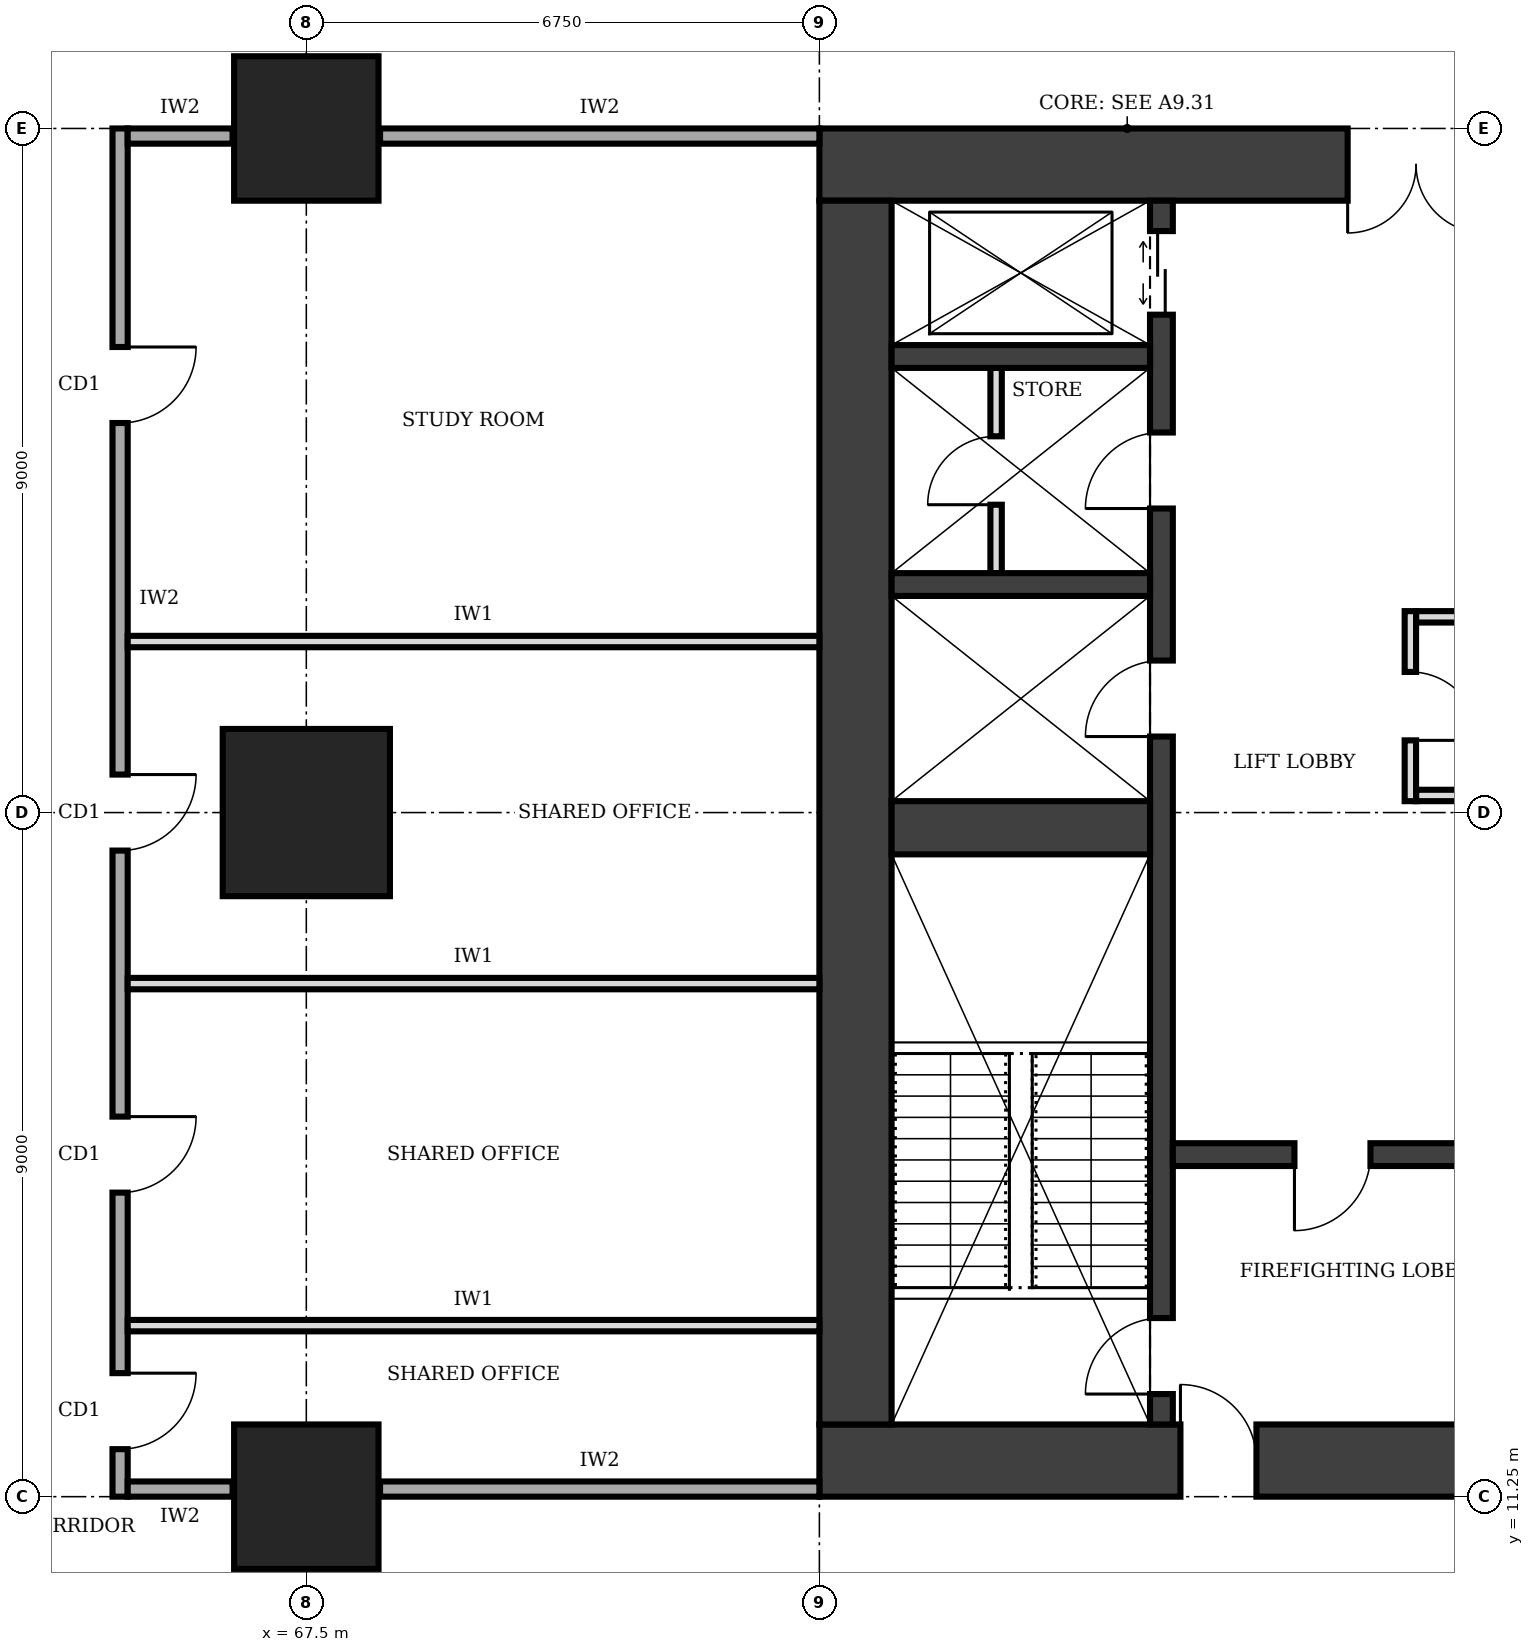
"""IFC4 building model, lengths in metres.
Left out: names, types, materials, properties, quantities, classifications, styles, units other than length and angle.
Written with IfcOpenShell. Run it as: python <this file> out.ifc"""

import sys

from ifc_helpers import new_model, si_unit, direction, frame, frame_2d, origin, origin_2d, place, context, subcontext, project, spatial, rectangle, extrude, element, fill, save


model = new_model("IFC4")
c1 = context("Model", 3, precision=1e-05, world=origin(), true_north=direction((0.0, 1.0)))
c2 = subcontext(c1, "Body", "Model", "MODEL_VIEW")
j1 = project(units=[si_unit("LENGTHUNIT", "METRE"), si_unit("PLANEANGLEUNIT", "RADIAN")], contexts=[c1])
p1 = place(None, origin())
s1 = spatial("IfcSite", under=j1, at=p1, CompositionType="ELEMENT")
p2 = place(p1, origin())
s2 = spatial("IfcBuilding", under=s1, at=p2, CompositionType="ELEMENT")
p3 = place(p2, frame((0.0, 0.0, 149.0)))
s3 = spatial("IfcBuildingStorey", under=s2, at=p3, CompositionType="ELEMENT", Elevation=149.0)
p4 = place(p3, frame((74.25, 11.725, 0.0), z_axis=(0.0, 0.0, 1.0), x_axis=(1.0, 0.0, 0.0)))
e1 = element("IfcWall", 1, at=p4, inside=s3, PredefinedType="SHEAR", context=c2, shape_type="SweptSolid", body=[
    extrude(rectangle(XDim=13.5, YDim=0.95, at=frame_2d((6.75, 0.0))), origin(), (0.0, 0.0, 1.0), 4.0),
])
p5 = place(p4, frame((4.75, 0.0, 0.0)))
e2 = element("IfcOpeningElement", 2, at=p5, cuts=e1, PredefinedType="OPENING", context=c2, shape_type="SweptSolid", body=[
    extrude(rectangle(XDim=1.0, YDim=2.1, at=frame_2d((0.5, 1.05))), frame((0.0, 0.485, 0.0), z_axis=(0.0, -1.0, 0.0), x_axis=(1.0, 0.0, 0.0)), (0.0, 0.0, 1.0), 0.97),
])
p6 = place(p3, frame((87.75, 28.775, 0.0), z_axis=(0.0, 0.0, 1.0), x_axis=(-1.0, 0.0, 0.0)))
e3 = element("IfcWall", 3, at=p6, inside=s3, PredefinedType="SHEAR", context=c2, shape_type="SweptSolid", body=[
    extrude(rectangle(XDim=13.5, YDim=0.95, at=frame_2d((6.75, 0.0))), origin(), (0.0, 0.0, 1.0), 4.0),
])
p7 = place(p6, frame((4.75, 0.0, 0.0)))
e4 = element("IfcOpeningElement", 4, at=p7, cuts=e3, PredefinedType="OPENING", context=c2, shape_type="SweptSolid", body=[
    extrude(rectangle(XDim=1.8, YDim=2.1, at=frame_2d((0.9, 1.05))), frame((0.0, 0.485, 0.0), z_axis=(0.0, -1.0, 0.0), x_axis=(1.0, 0.0, 0.0)), (0.0, 0.0, 1.0), 0.97),
])
p8 = place(p3, frame((74.725, 28.3, 0.0), z_axis=(0.0, 0.0, 1.0), x_axis=(0.0, -1.0, 0.0)))
e5 = element("IfcWall", 5, at=p8, inside=s3, PredefinedType="SHEAR", context=c2, shape_type="SweptSolid", body=[
    extrude(rectangle(XDim=16.1, YDim=0.95, at=frame_2d((8.05, 0.0))), origin(), (0.0, 0.0, 1.0), 4.0),
])
p9 = place(p3, frame((78.75, 12.2, 0.0), z_axis=(0.0, 0.0, 1.0), x_axis=(0.0, 1.0, 0.0)))
e6 = element("IfcWall", 6, at=p9, inside=s3, PredefinedType="SHEAR", context=c2, shape_type="SweptSolid", body=[
    extrude(rectangle(XDim=16.1, YDim=0.3, at=frame_2d((8.05, 0.0))), origin(), (0.0, 0.0, 1.0), 4.0),
])
p10 = place(p9, frame((0.4, 0.0, 0.0)))
e7 = element("IfcOpeningElement", 7, at=p10, cuts=e6, PredefinedType="OPENING", context=c2, shape_type="SweptSolid", body=[
    extrude(rectangle(XDim=1.0, YDim=2.1, at=frame_2d((0.5, 1.05))), frame((0.0, 0.16, 0.0), z_axis=(0.0, -1.0, 0.0), x_axis=(1.0, 0.0, 0.0)), (0.0, 0.0, 1.0), 0.32),
])
p11 = place(p9, frame((14.6, 0.0, 0.0)))
e8 = element("IfcOpeningElement", 8, at=p11, cuts=e6, PredefinedType="OPENING", context=c2, shape_type="SweptSolid", body=[
    extrude(rectangle(XDim=1.1, YDim=2.1, at=frame_2d((0.55, 1.05))), frame((0.0, 0.16, 0.0), z_axis=(0.0, -1.0, 0.0), x_axis=(1.0, 0.0, 0.0)), (0.0, 0.0, 1.0), 0.32),
])
p12 = place(p9, frame((9.05, 0.0, 0.0)))
e9 = element("IfcOpeningElement", 9, at=p12, cuts=e6, PredefinedType="OPENING", context=c2, shape_type="SweptSolid", body=[
    extrude(rectangle(XDim=1.0, YDim=2.1, at=frame_2d((0.5, 1.05))), frame((0.0, 0.16, 0.0), z_axis=(0.0, -1.0, 0.0), x_axis=(1.0, 0.0, 0.0)), (0.0, 0.0, 1.0), 0.32),
])
p13 = place(p9, frame((12.05, 0.0, 0.0)))
e10 = element("IfcOpeningElement", 10, at=p13, cuts=e6, PredefinedType="OPENING", context=c2, shape_type="SweptSolid", body=[
    extrude(rectangle(XDim=1.0, YDim=2.1, at=frame_2d((0.5, 1.05))), frame((0.0, 0.16, 0.0), z_axis=(0.0, -1.0, 0.0), x_axis=(1.0, 0.0, 0.0)), (0.0, 0.0, 1.0), 0.32),
])
p14 = place(p3, frame((75.2, 20.05, 0.0), z_axis=(0.0, 0.0, 1.0), x_axis=(1.0, 0.0, 0.0)))
e11 = element("IfcWall", 11, at=p14, inside=s3, PredefinedType="SHEAR", context=c2, shape_type="SweptSolid", body=[
    extrude(rectangle(XDim=3.4, YDim=0.7, at=frame_2d((1.7, 0.0))), origin(), (0.0, 0.0, 1.0), 4.0),
])
p15 = place(p3, frame((78.9, 15.75, 0.0), z_axis=(0.0, 0.0, 1.0), x_axis=(1.0, 0.0, 0.0)))
e12 = element("IfcWall", 12, at=p15, inside=s3, PredefinedType="SHEAR", context=c2, shape_type="SweptSolid", body=[
    extrude(rectangle(XDim=4.2, YDim=0.3, at=frame_2d((2.1, 0.0))), origin(), (0.0, 0.0, 1.0), 4.0),
])
p16 = place(p15, frame((1.6, 0.0, 0.0)))
e13 = element("IfcOpeningElement", 13, at=p16, cuts=e12, PredefinedType="OPENING", context=c2, shape_type="SweptSolid", body=[
    extrude(rectangle(XDim=1.0, YDim=2.1, at=frame_2d((0.5, 1.05))), frame((0.0, 0.16, 0.0), z_axis=(0.0, -1.0, 0.0), x_axis=(1.0, 0.0, 0.0)), (0.0, 0.0, 1.0), 0.32),
])
for number, where, z_axis, x_axis in (
    (14, (75.2, 23.25, 0.0), (0.0, 0.0, 1.0), (1.0, 0.0, 0.0)),
    (15, (75.2, 26.25, 0.0), (0.0, 0.0, 1.0), (1.0, 0.0, 0.0)),
):
    element("IfcWall", number, at=place(p3, frame(where, z_axis=z_axis, x_axis=x_axis)), inside=s3, PredefinedType="SHEAR", context=c2, shape_type="SweptSolid", body=[
        extrude(rectangle(XDim=3.4, YDim=0.3, at=frame_2d((1.7, 0.0))), origin(), (0.0, 0.0, 1.0), 4.0),
    ])
p17 = place(p3, frame((67.5, 11.25, 0.0), z_axis=(0.0, 0.0, 1.0), x_axis=(1.0, 0.0, 0.0)))
e16 = element("IfcColumn", 16, at=p17, inside=s3, PredefinedType="COLUMN", context=c2, shape_type="SweptSolid", body=[
    extrude(rectangle(XDim=1.9, YDim=1.9, at=origin_2d()), origin(), (0.0, 0.0, 1.0), 4.0),
])
p18 = place(p3, frame((67.5, 20.25, 0.0), z_axis=(0.0, 0.0, 1.0), x_axis=(1.0, 0.0, 0.0)))
e17 = element("IfcColumn", 17, at=p18, inside=s3, PredefinedType="COLUMN", context=c2, shape_type="SweptSolid", body=[
    extrude(rectangle(XDim=2.2, YDim=2.2, at=origin_2d()), origin(), (0.0, 0.0, 1.0), 4.0),
])
p19 = place(p3, frame((67.5, 29.25, 0.0), z_axis=(0.0, 0.0, 1.0), x_axis=(1.0, 0.0, 0.0)))
e18 = element("IfcColumn", 18, at=p19, inside=s3, PredefinedType="COLUMN", context=c2, shape_type="SweptSolid", body=[
    extrude(rectangle(XDim=1.9, YDim=1.9, at=origin_2d()), origin(), (0.0, 0.0, 1.0), 4.0),
])
p20 = place(p3, frame((82.025, 20.4, 0.0), z_axis=(0.0, 0.0, 1.0), x_axis=(0.0, 1.0, 0.0)))
e19 = element("IfcWall", 19, at=p20, inside=s3, PredefinedType="PARTITIONING", context=c2, shape_type="SweptSolid", body=[
    extrude(rectangle(XDim=2.5, YDim=0.15, at=frame_2d((1.25, 0.0))), origin(), (0.0, 0.0, 1.0), 3.75),
])
p21 = place(p20, frame((0.8, 0.0, 0.0)))
e20 = element("IfcOpeningElement", 20, at=p21, cuts=e19, PredefinedType="OPENING", context=c2, shape_type="SweptSolid", body=[
    extrude(rectangle(XDim=0.9, YDim=2.1, at=frame_2d((0.45, 1.05))), frame((0.0, 0.085, 0.0), z_axis=(0.0, -1.0, 0.0), x_axis=(1.0, 0.0, 0.0)), (0.0, 0.0, 1.0), 0.17),
])
for number, where, z_axis, x_axis in (
    (21, (82.1, 20.475, 0.0), (0.0, 0.0, 1.0), (1.0, 0.0, 0.0)),
    (22, (82.1, 22.825, 0.0), (0.0, 0.0, 1.0), (1.0, 0.0, 0.0)),
):
    element("IfcWall", number, at=place(p3, frame(where, z_axis=z_axis, x_axis=x_axis)), inside=s3, PredefinedType="PARTITIONING", context=c2, shape_type="SweptSolid", body=[
        extrude(rectangle(XDim=1.0, YDim=0.15, at=frame_2d((0.5, 0.0))), origin(), (0.0, 0.0, 1.0), 3.75),
    ])
p22 = place(p3, frame((76.575, 23.4, 0.0), z_axis=(0.0, 0.0, 1.0), x_axis=(0.0, 1.0, 0.0)))
e23 = element("IfcWall", 23, at=p22, inside=s3, PredefinedType="PARTITIONING", context=c2, shape_type="SweptSolid", body=[
    extrude(rectangle(XDim=2.7, YDim=0.15, at=frame_2d((1.35, 0.0))), origin(), (0.0, 0.0, 1.0), 3.75),
])
p23 = place(p22, frame((0.9, 0.0, 0.0)))
e24 = element("IfcOpeningElement", 24, at=p23, cuts=e23, PredefinedType="OPENING", context=c2, shape_type="SweptSolid", body=[
    extrude(rectangle(XDim=0.9, YDim=2.1, at=frame_2d((0.45, 1.05))), frame((0.0, 0.085, 0.0), z_axis=(0.0, -1.0, 0.0), x_axis=(1.0, 0.0, 0.0)), (0.0, 0.0, 1.0), 0.17),
])
p24 = place(p3, frame((65.05, 29.25, 0.0), z_axis=(0.0, 0.0, 1.0), x_axis=(0.0, -1.0, 0.0)))
e25 = element("IfcWall", 25, at=p24, inside=s3, PredefinedType="SOLIDWALL", context=c2, shape_type="SweptSolid", body=[
    extrude(rectangle(XDim=18.0, YDim=0.2, at=frame_2d((9.0, 0.0))), origin(), (0.0, 0.0, 1.0), 3.75),
])
p25 = place(p24, frame((16.375, 0.0, 0.0)))
e26 = element("IfcOpeningElement", 26, at=p25, cuts=e25, PredefinedType="OPENING", context=c2, shape_type="SweptSolid", body=[
    extrude(rectangle(XDim=1.0, YDim=2.1, at=frame_2d((0.5, 1.05))), frame((0.0, 0.11, 0.0), z_axis=(0.0, -1.0, 0.0), x_axis=(1.0, 0.0, 0.0)), (0.0, 0.0, 1.0), 0.22),
])
p26 = place(p24, frame((13.0, 0.0, 0.0)))
e27 = element("IfcOpeningElement", 27, at=p26, cuts=e25, PredefinedType="OPENING", context=c2, shape_type="SweptSolid", body=[
    extrude(rectangle(XDim=1.0, YDim=2.1, at=frame_2d((0.5, 1.05))), frame((0.0, 0.11, 0.0), z_axis=(0.0, -1.0, 0.0), x_axis=(1.0, 0.0, 0.0)), (0.0, 0.0, 1.0), 0.22),
])
p27 = place(p24, frame((8.5, 0.0, 0.0)))
e28 = element("IfcOpeningElement", 28, at=p27, cuts=e25, PredefinedType="OPENING", context=c2, shape_type="SweptSolid", body=[
    extrude(rectangle(XDim=1.0, YDim=2.1, at=frame_2d((0.5, 1.05))), frame((0.0, 0.11, 0.0), z_axis=(0.0, -1.0, 0.0), x_axis=(1.0, 0.0, 0.0)), (0.0, 0.0, 1.0), 0.22),
])
p28 = place(p24, frame((2.875, 0.0, 0.0)))
e29 = element("IfcOpeningElement", 29, at=p28, cuts=e25, PredefinedType="OPENING", context=c2, shape_type="SweptSolid", body=[
    extrude(rectangle(XDim=1.0, YDim=2.1, at=frame_2d((0.5, 1.05))), frame((0.0, 0.11, 0.0), z_axis=(0.0, -1.0, 0.0), x_axis=(1.0, 0.0, 0.0)), (0.0, 0.0, 1.0), 0.22),
])
p29 = place(p3, frame((65.15, 11.35, 0.0), z_axis=(0.0, 0.0, 1.0), x_axis=(1.0, 0.0, 0.0)))
e30 = element("IfcWall", 30, at=p29, inside=s3, PredefinedType="SOLIDWALL", context=c2, shape_type="SweptSolid", body=[
    extrude(rectangle(XDim=1.38, YDim=0.2, at=frame_2d((0.69, 0.0))), origin(), (0.0, 0.0, 1.0), 2.85),
])
p30 = place(p3, frame((68.47, 11.35, 0.0), z_axis=(0.0, 0.0, 1.0), x_axis=(1.0, 0.0, 0.0)))
e31 = element("IfcWall", 31, at=p30, inside=s3, PredefinedType="SOLIDWALL", context=c2, shape_type="SweptSolid", body=[
    extrude(rectangle(XDim=5.78, YDim=0.2, at=frame_2d((2.89, 0.0))), origin(), (0.0, 0.0, 1.0), 2.85),
])
p31 = place(p3, frame((65.15, 29.15, 0.0), z_axis=(0.0, 0.0, 1.0), x_axis=(1.0, 0.0, 0.0)))
e32 = element("IfcWall", 32, at=p31, inside=s3, PredefinedType="SOLIDWALL", context=c2, shape_type="SweptSolid", body=[
    extrude(rectangle(XDim=1.38, YDim=0.2, at=frame_2d((0.69, 0.0))), origin(), (0.0, 0.0, 1.0), 2.85),
])
p32 = place(p3, frame((68.47, 29.15, 0.0), z_axis=(0.0, 0.0, 1.0), x_axis=(1.0, 0.0, 0.0)))
e33 = element("IfcWall", 33, at=p32, inside=s3, PredefinedType="SOLIDWALL", context=c2, shape_type="SweptSolid", body=[
    extrude(rectangle(XDim=5.78, YDim=0.2, at=frame_2d((2.89, 0.0))), origin(), (0.0, 0.0, 1.0), 2.85),
])
for number, where, z_axis, x_axis in (
    (34, (65.15, 13.5, 0.0), (0.0, 0.0, 1.0), (1.0, 0.0, 0.0)),
    (35, (65.15, 18.0, 0.0), (0.0, 0.0, 1.0), (1.0, 0.0, 0.0)),
    (36, (65.15, 22.5, 0.0), (0.0, 0.0, 1.0), (1.0, 0.0, 0.0)),
):
    element("IfcWall", number, at=place(p3, frame(where, z_axis=z_axis, x_axis=x_axis)), inside=s3, PredefinedType="PARTITIONING", context=c2, shape_type="SweptSolid", body=[
        extrude(rectangle(XDim=9.1, YDim=0.15, at=frame_2d((4.55, 0.0))), origin(), (0.0, 0.0, 1.0), 3.75),
    ])
p33 = place(p5, origin())
e37 = element("IfcDoor", 37, at=p33, inside=s3, OperationType="SINGLE_SWING_LEFT", PredefinedType="DOOR", context=c2, shape_type="SweptSolid", body=[
    extrude(rectangle(XDim=1.0, YDim=2.1, at=frame_2d((0.5, 1.05))), frame((0.0, 0.025, 0.0), z_axis=(0.0, -1.0, 0.0), x_axis=(1.0, 0.0, 0.0)), (0.0, 0.0, 1.0), 0.05),
])
fill(e2, e37)
p34 = place(p7, origin())
e38 = element("IfcDoor", 38, at=p34, inside=s3, OperationType="DOUBLE_DOOR_SINGLE_SWING", PredefinedType="DOOR", context=c2, shape_type="SweptSolid", body=[
    extrude(rectangle(XDim=1.8, YDim=2.1, at=frame_2d((0.9, 1.05))), frame((0.0, 0.025, 0.0), z_axis=(0.0, -1.0, 0.0), x_axis=(1.0, 0.0, 0.0)), (0.0, 0.0, 1.0), 0.05),
])
fill(e4, e38)
p35 = place(p16, frame((1.0, 0.0, 0.0), z_axis=(0.0, 0.0, 1.0), x_axis=(-1.0, 0.0, 0.0)))
e39 = element("IfcDoor", 39, at=p35, inside=s3, OperationType="SINGLE_SWING_RIGHT", PredefinedType="DOOR", context=c2, shape_type="SweptSolid", body=[
    extrude(rectangle(XDim=1.0, YDim=2.1, at=frame_2d((0.5, 1.05))), frame((0.0, 0.025, 0.0), z_axis=(0.0, -1.0, 0.0), x_axis=(1.0, 0.0, 0.0)), (0.0, 0.0, 1.0), 0.05),
])
fill(e13, e39)
p36 = place(p10, origin())
e40 = element("IfcDoor", 40, at=p36, inside=s3, OperationType="SINGLE_SWING_LEFT", PredefinedType="DOOR", context=c2, shape_type="SweptSolid", body=[
    extrude(rectangle(XDim=1.0, YDim=2.1, at=frame_2d((0.5, 1.05))), frame((0.0, 0.025, 0.0), z_axis=(0.0, -1.0, 0.0), x_axis=(1.0, 0.0, 0.0)), (0.0, 0.0, 1.0), 0.05),
])
fill(e7, e40)
p37 = place(p11, origin())
e41 = element("IfcDoor", 41, at=p37, inside=s3, OperationType="DOUBLE_DOOR_SLIDING", PredefinedType="DOOR", context=c2, shape_type="SweptSolid", body=[
    extrude(rectangle(XDim=1.1, YDim=2.1, at=frame_2d((0.55, 1.05))), frame((0.0, 0.025, 0.0), z_axis=(0.0, -1.0, 0.0), x_axis=(1.0, 0.0, 0.0)), (0.0, 0.0, 1.0), 0.05),
])
fill(e8, e41)
p38 = place(p21, frame((0.9, 0.0, 0.0), z_axis=(0.0, 0.0, 1.0), x_axis=(-1.0, 0.0, 0.0)))
e42 = element("IfcDoor", 42, at=p38, inside=s3, OperationType="SINGLE_SWING_RIGHT", PredefinedType="DOOR", context=c2, shape_type="SweptSolid", body=[
    extrude(rectangle(XDim=0.9, YDim=2.1, at=frame_2d((0.45, 1.05))), frame((0.0, 0.025, 0.0), z_axis=(0.0, -1.0, 0.0), x_axis=(1.0, 0.0, 0.0)), (0.0, 0.0, 1.0), 0.05),
])
fill(e20, e42)
p39 = place(p12, origin())
e43 = element("IfcDoor", 43, at=p39, inside=s3, OperationType="SINGLE_SWING_LEFT", PredefinedType="DOOR", context=c2, shape_type="SweptSolid", body=[
    extrude(rectangle(XDim=1.0, YDim=2.1, at=frame_2d((0.5, 1.05))), frame((0.0, 0.025, 0.0), z_axis=(0.0, -1.0, 0.0), x_axis=(1.0, 0.0, 0.0)), (0.0, 0.0, 1.0), 0.05),
])
fill(e9, e43)
p40 = place(p13, origin())
e44 = element("IfcDoor", 44, at=p40, inside=s3, OperationType="SINGLE_SWING_LEFT", PredefinedType="DOOR", context=c2, shape_type="SweptSolid", body=[
    extrude(rectangle(XDim=1.0, YDim=2.1, at=frame_2d((0.5, 1.05))), frame((0.0, 0.025, 0.0), z_axis=(0.0, -1.0, 0.0), x_axis=(1.0, 0.0, 0.0)), (0.0, 0.0, 1.0), 0.05),
])
fill(e10, e44)
p41 = place(p23, origin())
e45 = element("IfcDoor", 45, at=p41, inside=s3, OperationType="SINGLE_SWING_LEFT", PredefinedType="DOOR", context=c2, shape_type="SweptSolid", body=[
    extrude(rectangle(XDim=0.9, YDim=2.1, at=frame_2d((0.45, 1.05))), frame((0.0, 0.025, 0.0), z_axis=(0.0, -1.0, 0.0), x_axis=(1.0, 0.0, 0.0)), (0.0, 0.0, 1.0), 0.05),
])
fill(e24, e45)
p42 = place(p25, origin())
e46 = element("IfcDoor", 46, at=p42, inside=s3, OperationType="SINGLE_SWING_LEFT", PredefinedType="DOOR", context=c2, shape_type="SweptSolid", body=[
    extrude(rectangle(XDim=1.0, YDim=2.1, at=frame_2d((0.5, 1.05))), frame((0.0, 0.025, 0.0), z_axis=(0.0, -1.0, 0.0), x_axis=(1.0, 0.0, 0.0)), (0.0, 0.0, 1.0), 0.05),
])
fill(e26, e46)
p43 = place(p26, origin())
e47 = element("IfcDoor", 47, at=p43, inside=s3, OperationType="SINGLE_SWING_LEFT", PredefinedType="DOOR", context=c2, shape_type="SweptSolid", body=[
    extrude(rectangle(XDim=1.0, YDim=2.1, at=frame_2d((0.5, 1.05))), frame((0.0, 0.025, 0.0), z_axis=(0.0, -1.0, 0.0), x_axis=(1.0, 0.0, 0.0)), (0.0, 0.0, 1.0), 0.05),
])
fill(e27, e47)
p44 = place(p27, origin())
e48 = element("IfcDoor", 48, at=p44, inside=s3, OperationType="SINGLE_SWING_LEFT", PredefinedType="DOOR", context=c2, shape_type="SweptSolid", body=[
    extrude(rectangle(XDim=1.0, YDim=2.1, at=frame_2d((0.5, 1.05))), frame((0.0, 0.025, 0.0), z_axis=(0.0, -1.0, 0.0), x_axis=(1.0, 0.0, 0.0)), (0.0, 0.0, 1.0), 0.05),
])
fill(e28, e48)
p45 = place(p28, origin())
e49 = element("IfcDoor", 49, at=p45, inside=s3, OperationType="SINGLE_SWING_LEFT", PredefinedType="DOOR", context=c2, shape_type="SweptSolid", body=[
    extrude(rectangle(XDim=1.0, YDim=2.1, at=frame_2d((0.5, 1.05))), frame((0.0, 0.025, 0.0), z_axis=(0.0, -1.0, 0.0), x_axis=(1.0, 0.0, 0.0)), (0.0, 0.0, 1.0), 0.05),
])
fill(e29, e49)
save(model, sys.argv[1])
